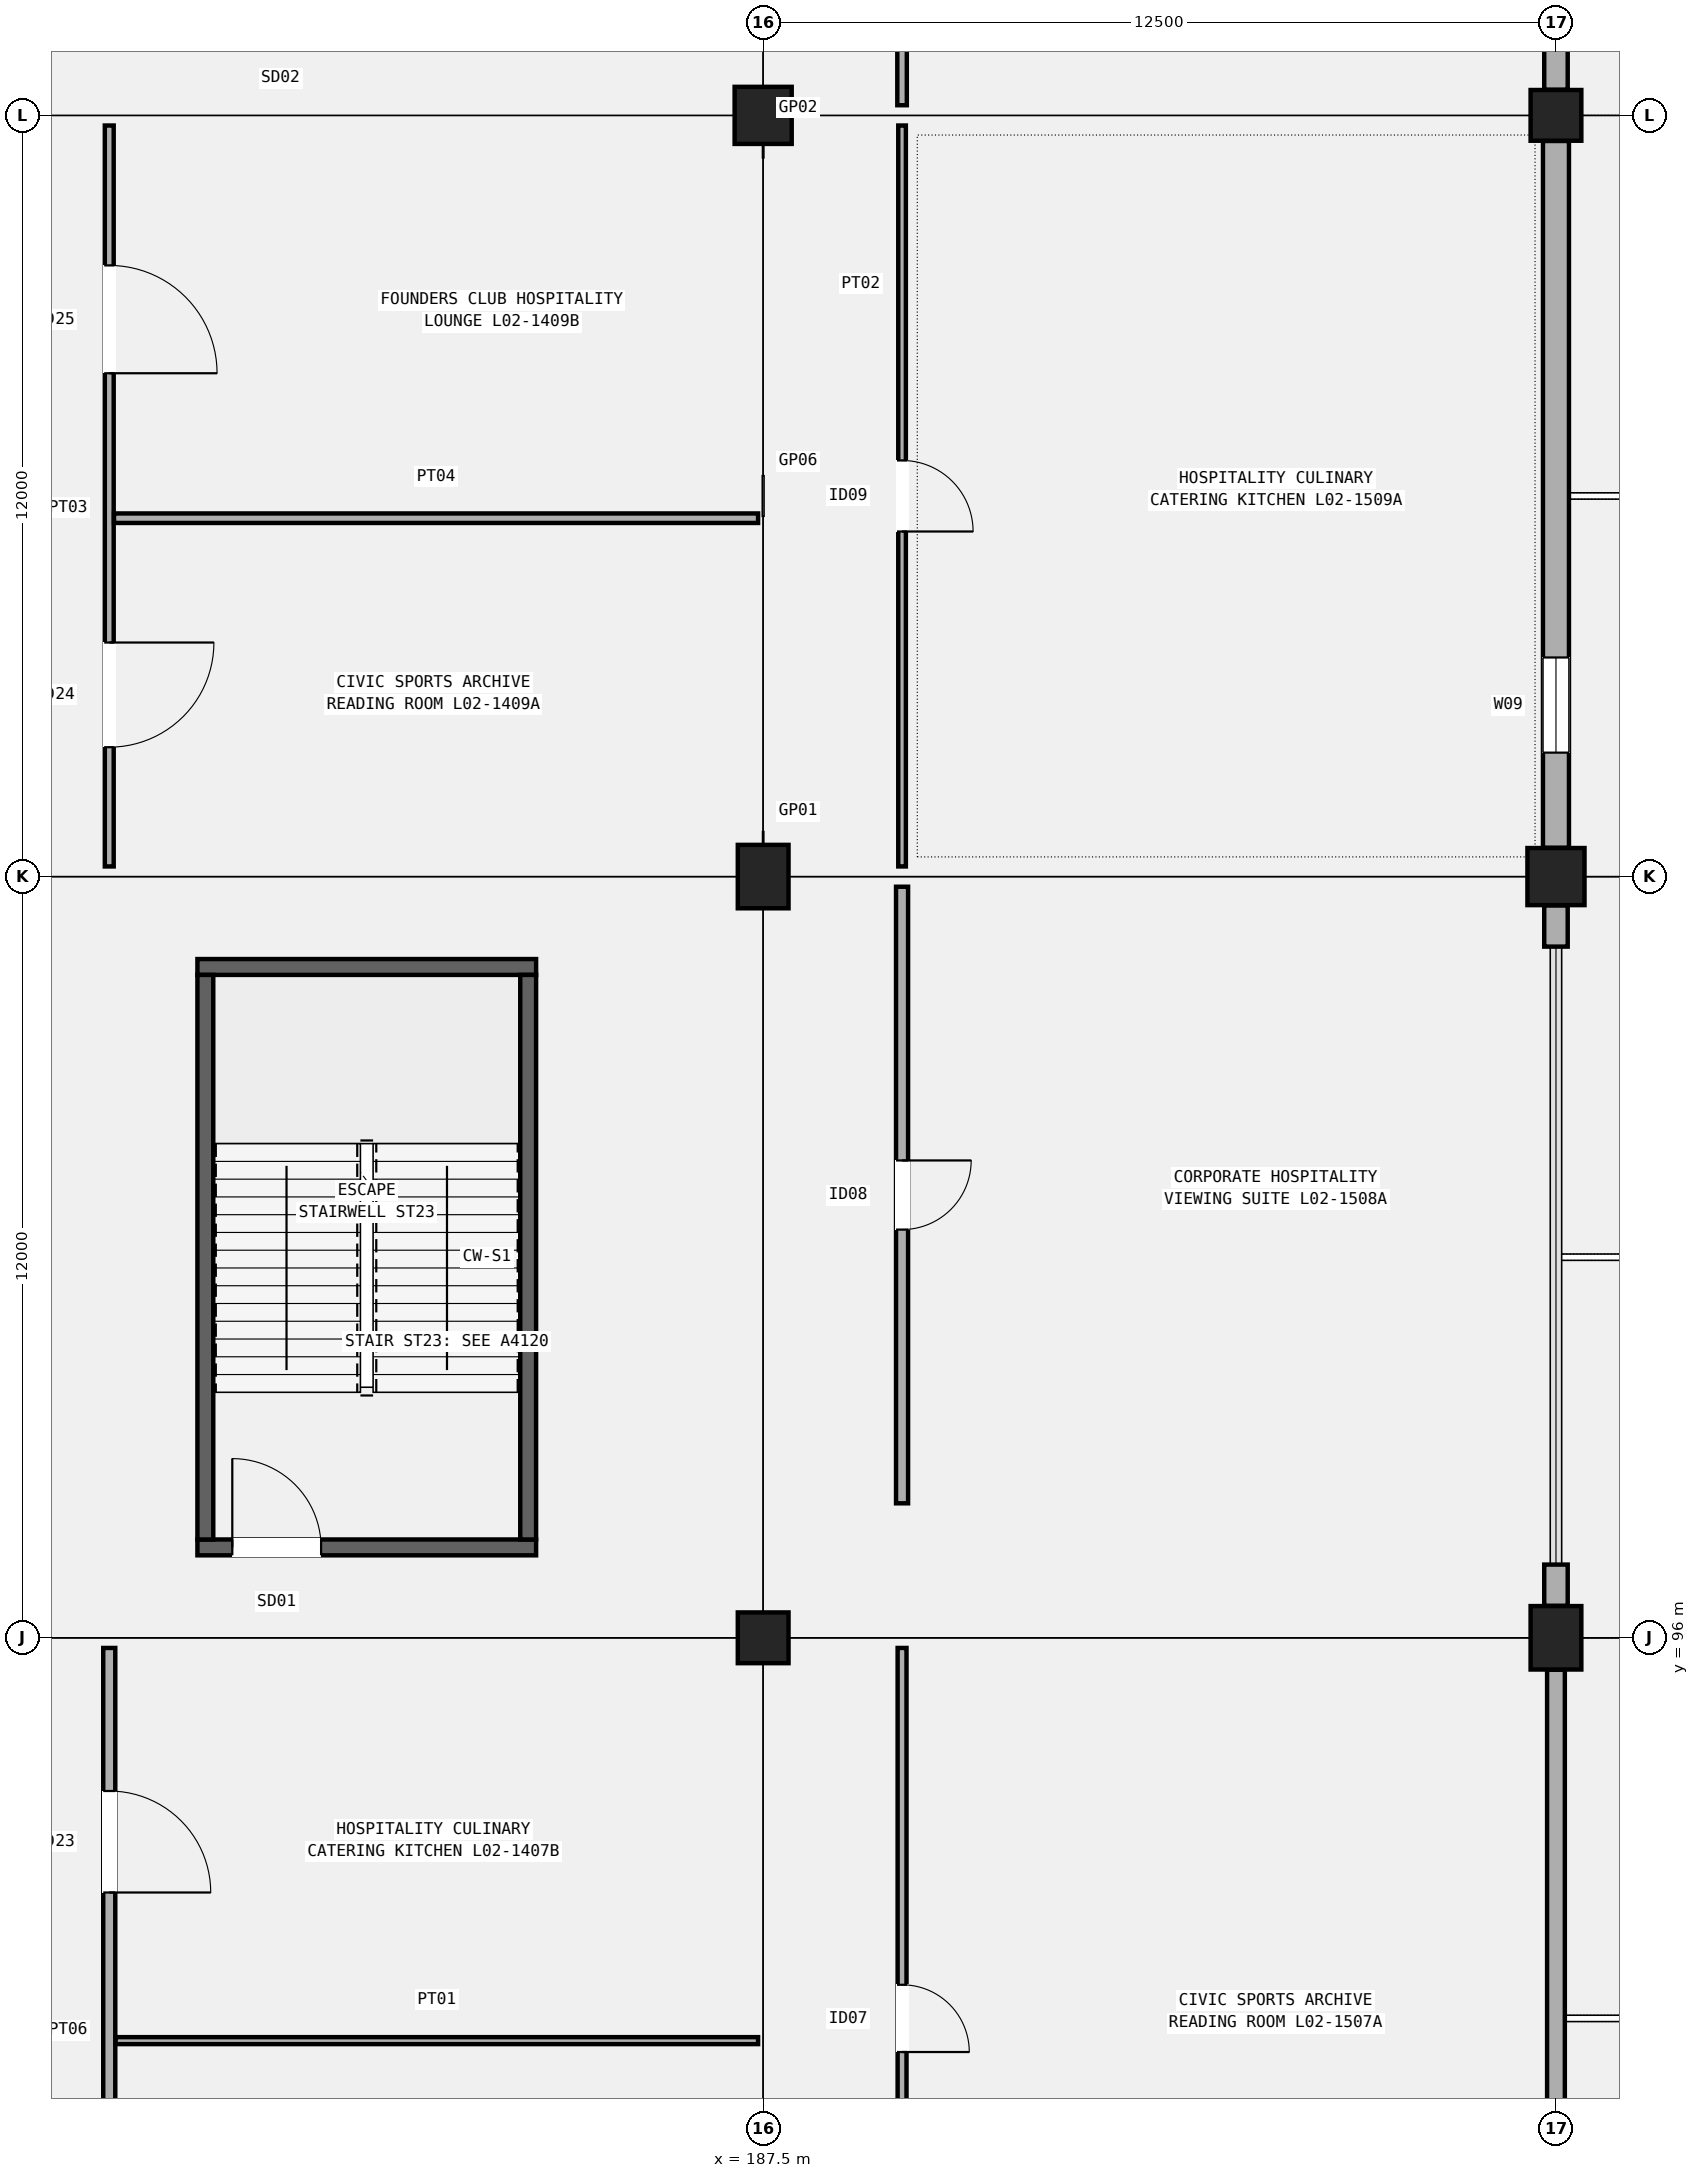
"""IFC4 building model, lengths in metres.
Left out: names, types, materials, properties, quantities, classifications, styles, units other than length and angle.
Written with IfcOpenShell. Run it as: python <this file> out.ifc"""

import sys

from ifc_helpers import new_model, si_unit, direction, frame, frame_2d, origin, origin_2d, place, context, subcontext, project, spatial, rectangle, extrude, element, fill, save


model = new_model("IFC4")
c1 = context("Model", 3, precision=1e-05, world=origin(), true_north=direction((0.0, 1.0)))
c2 = subcontext(c1, "Body", "Model", "MODEL_VIEW")
j1 = project(units=[si_unit("LENGTHUNIT", "METRE"), si_unit("PLANEANGLEUNIT", "RADIAN")], contexts=[c1])
p1 = place(None, origin())
s1 = spatial("IfcSite", under=j1, at=p1, CompositionType="ELEMENT")
p2 = place(p1, origin())
s2 = spatial("IfcBuilding", under=s1, at=p2, CompositionType="ELEMENT")
p3 = place(p2, frame((0.0, 0.0, 10.2)))
s3 = spatial("IfcBuildingStorey", under=s2, at=p3, CompositionType="ELEMENT", Elevation=10.2)
p4 = place(p3, frame((187.5, 96.0, 0.0), z_axis=(0.0, 0.0, 1.0), x_axis=(1.0, 0.0, 0.0)))
e1 = element("IfcColumn", 1, at=p4, inside=s3, PredefinedType="COLUMN", context=c2, shape_type="SweptSolid", body=[
    extrude(rectangle(XDim=0.8, YDim=0.8, at=origin_2d()), origin(), (0.0, 0.0, 1.0), 5.1),
])
p5 = place(p3, frame((187.5, 108.0, 0.0), z_axis=(0.0, 0.0, 1.0), x_axis=(1.0, 0.0, 0.0)))
e2 = element("IfcColumn", 2, at=p5, inside=s3, PredefinedType="COLUMN", context=c2, shape_type="SweptSolid", body=[
    extrude(rectangle(XDim=0.8, YDim=1.0, at=origin_2d()), origin(), (0.0, 0.0, 1.0), 5.1),
])
p6 = place(p3, frame((187.5, 120.0, 0.0), z_axis=(0.0, 0.0, 1.0), x_axis=(1.0, 0.0, 0.0)))
e3 = element("IfcColumn", 3, at=p6, inside=s3, PredefinedType="COLUMN", context=c2, shape_type="SweptSolid", body=[
    extrude(rectangle(XDim=0.9, YDim=0.9, at=origin_2d()), origin(), (0.0, 0.0, 1.0), 5.1),
])
p7 = place(p3, frame((200.0, 96.0, 0.0), z_axis=(0.0, 0.0, 1.0), x_axis=(1.0, 0.0, 0.0)))
e4 = element("IfcColumn", 4, at=p7, inside=s3, PredefinedType="COLUMN", context=c2, shape_type="SweptSolid", body=[
    extrude(rectangle(XDim=0.8, YDim=1.0, at=origin_2d()), origin(), (0.0, 0.0, 1.0), 5.1),
])
p8 = place(p3, frame((200.0, 108.0, 0.0), z_axis=(0.0, 0.0, 1.0), x_axis=(1.0, 0.0, 0.0)))
e5 = element("IfcColumn", 5, at=p8, inside=s3, PredefinedType="COLUMN", context=c2, shape_type="SweptSolid", body=[
    extrude(rectangle(XDim=0.9, YDim=0.9, at=origin_2d()), origin(), (0.0, 0.0, 1.0), 5.1),
])
p9 = place(p3, frame((200.0, 120.0, 0.0), z_axis=(0.0, 0.0, 1.0), x_axis=(1.0, 0.0, 0.0)))
e6 = element("IfcColumn", 6, at=p9, inside=s3, PredefinedType="COLUMN", context=c2, shape_type="SweptSolid", body=[
    extrude(rectangle(XDim=0.8, YDim=0.8, at=origin_2d()), origin(), (0.0, 0.0, 1.0), 5.1),
])
p10 = place(p3, frame((200.0, 84.404, 0.0), z_axis=(0.0, 0.0, 1.0), x_axis=(0.0, 1.0, 0.0)))
e7 = element("IfcWall", 7, at=p10, inside=s3, PredefinedType="SOLIDWALL", context=c2, shape_type="SweptSolid", body=[
    extrude(rectangle(XDim=11.092, YDim=0.28, at=frame_2d((5.546, 0.0))), origin(), (0.0, 0.0, 1.0), 4.232),
])
p11 = place(p10, frame((1.5, 0.0, 0.95)))
e8 = element("IfcOpeningElement", 8, at=p11, cuts=e7, PredefinedType="OPENING", context=c2, shape_type="SweptSolid", body=[
    extrude(rectangle(XDim=1.35, YDim=2.4, at=frame_2d((0.675, 1.2))), frame((0.0, 0.15, 0.0), z_axis=(0.0, -1.0, 0.0), x_axis=(1.0, 0.0, 0.0)), (0.0, 0.0, 1.0), 0.3),
])
p12 = place(p3, frame((200.0, 96.504, 0.0), z_axis=(0.0, 0.0, 1.0), x_axis=(0.0, 1.0, 0.0)))
e9 = element("IfcWall", 9, at=p12, inside=s3, PredefinedType="SOLIDWALL", context=c2, shape_type="SweptSolid", body=[
    extrude(rectangle(XDim=0.65, YDim=0.37, at=frame_2d((0.325, 0.0))), origin(), (0.0, 0.0, 1.0), 4.02),
])
p13 = place(p3, frame((200.0, 106.896, 0.0), z_axis=(0.0, 0.0, 1.0), x_axis=(0.0, 1.0, 0.0)))
e10 = element("IfcWall", 10, at=p13, inside=s3, PredefinedType="SOLIDWALL", context=c2, shape_type="SweptSolid", body=[
    extrude(rectangle(XDim=0.65, YDim=0.37, at=frame_2d((0.325, 0.0))), origin(), (0.0, 0.0, 1.0), 4.02),
])
p14 = place(p3, frame((200.0, 108.454, 0.0), z_axis=(0.0, 0.0, 1.0), x_axis=(0.0, 1.0, 0.0)))
e11 = element("IfcWall", 11, at=p14, inside=s3, PredefinedType="SOLIDWALL", context=c2, shape_type="SweptSolid", body=[
    extrude(rectangle(XDim=11.142, YDim=0.41, at=frame_2d((5.571, 0.0))), origin(), (0.0, 0.0, 1.0), 4.12),
])
p15 = place(p14, frame((1.5, 0.0, 0.95)))
e12 = element("IfcOpeningElement", 12, at=p15, cuts=e11, PredefinedType="OPENING", context=c2, shape_type="SweptSolid", body=[
    extrude(rectangle(XDim=1.5, YDim=1.8, at=frame_2d((0.75, 0.9))), frame((0.0, 0.215, 0.0), z_axis=(0.0, -1.0, 0.0), x_axis=(1.0, 0.0, 0.0)), (0.0, 0.0, 1.0), 0.43),
])
p16 = place(p3, frame((200.0, 120.404, 0.0), z_axis=(0.0, 0.0, 1.0), x_axis=(0.0, 1.0, 0.0)))
e13 = element("IfcWall", 13, at=p16, inside=s3, PredefinedType="SOLIDWALL", context=c2, shape_type="SweptSolid", body=[
    extrude(rectangle(XDim=0.65, YDim=0.37, at=frame_2d((0.325, 0.0))), origin(), (0.0, 0.0, 1.0), 4.232),
])
p17 = place(p3, frame((178.58, 97.425, 0.0), z_axis=(0.0, 0.0, 1.0), x_axis=(1.0, 0.0, 0.0)))
e14 = element("IfcWall", 14, at=p17, inside=s3, PredefinedType="SHEAR", context=c2, shape_type="SweptSolid", body=[
    extrude(rectangle(XDim=5.34, YDim=0.25, at=frame_2d((2.67, 0.0))), origin(), (0.0, 0.0, 1.0), 4.82),
])
p18 = place(p17, frame((0.55, 0.0, 0.0)))
e15 = element("IfcOpeningElement", 15, at=p18, cuts=e14, PredefinedType="OPENING", context=c2, shape_type="SweptSolid", body=[
    extrude(rectangle(XDim=1.4, YDim=2.15, at=frame_2d((0.7, 1.075))), frame((0.0, 0.135, 0.0), z_axis=(0.0, -1.0, 0.0), x_axis=(1.0, 0.0, 0.0)), (0.0, 0.0, 1.0), 0.27),
])
p19 = place(p3, frame((178.58, 106.575, 0.0), z_axis=(0.0, 0.0, 1.0), x_axis=(1.0, 0.0, 0.0)))
e16 = element("IfcWall", 16, at=p19, inside=s3, PredefinedType="SHEAR", context=c2, shape_type="SweptSolid", body=[
    extrude(rectangle(XDim=5.34, YDim=0.25, at=frame_2d((2.67, 0.0))), origin(), (0.0, 0.0, 1.0), 4.82),
])
for number, where, z_axis, x_axis in (
    (17, (178.705, 97.55, 0.0), (0.0, 0.0, 1.0), (0.0, 1.0, 0.0)),
    (18, (183.795, 97.55, 0.0), (0.0, 0.0, 1.0), (0.0, 1.0, 0.0)),
):
    element("IfcWall", number, at=place(p3, frame(where, z_axis=z_axis, x_axis=x_axis)), inside=s3, PredefinedType="SHEAR", context=c2, shape_type="SweptSolid", body=[
        extrude(rectangle(XDim=8.9, YDim=0.25, at=frame_2d((4.45, 0.0))), origin(), (0.0, 0.0, 1.0), 4.82),
    ])
p20 = place(p3, frame((177.19, 84.16, 0.0), z_axis=(0.0, 0.0, 1.0), x_axis=(0.0, 1.0, 0.0)))
e19 = element("IfcWall", 19, at=p20, inside=s3, PredefinedType="PARTITIONING", context=c2, shape_type="SweptSolid", body=[
    extrude(rectangle(XDim=11.68, YDim=0.19, at=frame_2d((5.84, 0.0))), origin(), (0.0, 0.0, 1.0), 4.22),
])
p21 = place(p20, frame((3.485, 0.0, 0.0), z_axis=(0.0, 0.0, 1.0), x_axis=(-1.0, 0.0, 0.0)))
e20 = element("IfcOpeningElement", 20, at=p21, cuts=e19, PredefinedType="OPENING", context=c2, shape_type="SweptSolid", body=[
    extrude(rectangle(XDim=1.56, YDim=2.26, at=frame_2d((0.78, 1.13))), frame((0.0, 0.105, 0.0), z_axis=(0.0, -1.0, 0.0), x_axis=(1.0, 0.0, 0.0)), (0.0, 0.0, 1.0), 0.21),
])
p22 = place(p20, frame((9.425, 0.0, 0.0), z_axis=(0.0, 0.0, 1.0), x_axis=(-1.0, 0.0, 0.0)))
e21 = element("IfcOpeningElement", 21, at=p22, cuts=e19, PredefinedType="OPENING", context=c2, shape_type="SweptSolid", body=[
    extrude(rectangle(XDim=1.6, YDim=2.3, at=frame_2d((0.8, 1.15))), frame((0.0, 0.105, 0.0), z_axis=(0.0, -1.0, 0.0), x_axis=(1.0, 0.0, 0.0)), (0.0, 0.0, 1.0), 0.21),
])
p23 = place(p3, frame((177.29, 89.65, 0.0), z_axis=(0.0, 0.0, 1.0), x_axis=(1.0, 0.0, 0.0)))
e22 = element("IfcWall", 22, at=p23, inside=s3, PredefinedType="PARTITIONING", context=c2, shape_type="SweptSolid", body=[
    extrude(rectangle(XDim=10.13, YDim=0.11, at=frame_2d((5.065, 0.0))), origin(), (0.0, 0.0, 1.0), 4.22),
])
p24 = place(p3, frame((177.19, 108.16, 0.0), z_axis=(0.0, 0.0, 1.0), x_axis=(0.0, 1.0, 0.0)))
e23 = element("IfcWall", 23, at=p24, inside=s3, PredefinedType="PARTITIONING", context=c2, shape_type="SweptSolid", body=[
    extrude(rectangle(XDim=11.68, YDim=0.14, at=frame_2d((5.84, 0.0))), origin(), (0.0, 0.0, 1.0), 4.22),
])
p25 = place(p24, frame((3.53, 0.0, 0.0), z_axis=(0.0, 0.0, 1.0), x_axis=(-1.0, 0.0, 0.0)))
e24 = element("IfcOpeningElement", 24, at=p25, cuts=e23, PredefinedType="OPENING", context=c2, shape_type="SweptSolid", body=[
    extrude(rectangle(XDim=1.65, YDim=2.28, at=frame_2d((0.825, 1.14))), frame((0.0, 0.08, 0.0), z_axis=(0.0, -1.0, 0.0), x_axis=(1.0, 0.0, 0.0)), (0.0, 0.0, 1.0), 0.16),
])
p26 = place(p24, frame((9.475, 0.0, 0.0), z_axis=(0.0, 0.0, 1.0), x_axis=(-1.0, 0.0, 0.0)))
e25 = element("IfcOpeningElement", 25, at=p26, cuts=e23, PredefinedType="OPENING", context=c2, shape_type="SweptSolid", body=[
    extrude(rectangle(XDim=1.7, YDim=2.32, at=frame_2d((0.85, 1.16))), frame((0.0, 0.08, 0.0), z_axis=(0.0, -1.0, 0.0), x_axis=(1.0, 0.0, 0.0)), (0.0, 0.0, 1.0), 0.16),
])
p27 = place(p3, frame((177.265, 113.65, 0.0), z_axis=(0.0, 0.0, 1.0), x_axis=(1.0, 0.0, 0.0)))
e26 = element("IfcWall", 26, at=p27, inside=s3, PredefinedType="PARTITIONING", context=c2, shape_type="SweptSolid", body=[
    extrude(rectangle(XDim=10.155, YDim=0.15, at=frame_2d((5.078, 0.0))), origin(), (0.0, 0.0, 1.0), 4.22),
])
p28 = place(p3, frame((189.69, 84.16, 0.0), z_axis=(0.0, 0.0, 1.0), x_axis=(0.0, 1.0, 0.0)))
e27 = element("IfcWall", 27, at=p28, inside=s3, PredefinedType="PARTITIONING", context=c2, shape_type="SweptSolid", body=[
    extrude(rectangle(XDim=11.68, YDim=0.14, at=frame_2d((5.84, 0.0))), origin(), (0.0, 0.0, 1.0), 4.22),
])
p29 = place(p28, frame((6.37, 0.0, 0.0), z_axis=(0.0, 0.0, 1.0), x_axis=(-1.0, 0.0, 0.0)))
e28 = element("IfcOpeningElement", 28, at=p29, cuts=e27, PredefinedType="OPENING", context=c2, shape_type="SweptSolid", body=[
    extrude(rectangle(XDim=1.06, YDim=2.15, at=frame_2d((0.53, 1.075))), frame((0.0, 0.08, 0.0), z_axis=(0.0, -1.0, 0.0), x_axis=(1.0, 0.0, 0.0)), (0.0, 0.0, 1.0), 0.16),
])
p30 = place(p3, frame((189.69, 98.12, 0.0), z_axis=(0.0, 0.0, 1.0), x_axis=(0.0, 1.0, 0.0)))
e29 = element("IfcWall", 29, at=p30, inside=s3, PredefinedType="PARTITIONING", context=c2, shape_type="SweptSolid", body=[
    extrude(rectangle(XDim=9.72, YDim=0.19, at=frame_2d((4.86, 0.0))), origin(), (0.0, 0.0, 1.0), 4.22),
])
p31 = place(p30, frame((5.405, 0.0, 0.0), z_axis=(0.0, 0.0, 1.0), x_axis=(-1.0, 0.0, 0.0)))
e30 = element("IfcOpeningElement", 30, at=p31, cuts=e29, PredefinedType="OPENING", context=c2, shape_type="SweptSolid", body=[
    extrude(rectangle(XDim=1.09, YDim=2.16, at=frame_2d((0.545, 1.08))), frame((0.0, 0.105, 0.0), z_axis=(0.0, -1.0, 0.0), x_axis=(1.0, 0.0, 0.0)), (0.0, 0.0, 1.0), 0.21),
])
p32 = place(p3, frame((189.69, 108.16, 0.0), z_axis=(0.0, 0.0, 1.0), x_axis=(0.0, 1.0, 0.0)))
e31 = element("IfcWall", 31, at=p32, inside=s3, PredefinedType="PARTITIONING", context=c2, shape_type="SweptSolid", body=[
    extrude(rectangle(XDim=11.68, YDim=0.12, at=frame_2d((5.84, 0.0))), origin(), (0.0, 0.0, 1.0), 4.22),
])
p33 = place(p32, frame((6.4, 0.0, 0.0), z_axis=(0.0, 0.0, 1.0), x_axis=(-1.0, 0.0, 0.0)))
e32 = element("IfcOpeningElement", 32, at=p33, cuts=e31, PredefinedType="OPENING", context=c2, shape_type="SweptSolid", body=[
    extrude(rectangle(XDim=1.12, YDim=2.18, at=frame_2d((0.56, 1.09))), frame((0.0, 0.07, 0.0), z_axis=(0.0, -1.0, 0.0), x_axis=(1.0, 0.0, 0.0)), (0.0, 0.0, 1.0), 0.14),
])
p34 = place(p3, frame((189.69, 120.16, 0.0), z_axis=(0.0, 0.0, 1.0), x_axis=(0.0, 1.0, 0.0)))
e33 = element("IfcWall", 33, at=p34, inside=s3, PredefinedType="PARTITIONING", context=c2, shape_type="SweptSolid", body=[
    extrude(rectangle(XDim=11.68, YDim=0.15, at=frame_2d((5.84, 0.0))), origin(), (0.0, 0.0, 1.0), 4.22),
])
p35 = place(p34, frame((6.415, 0.0, 0.0), z_axis=(0.0, 0.0, 1.0), x_axis=(-1.0, 0.0, 0.0)))
e34 = element("IfcOpeningElement", 34, at=p35, cuts=e33, PredefinedType="OPENING", context=c2, shape_type="SweptSolid", body=[
    extrude(rectangle(XDim=1.15, YDim=2.15, at=frame_2d((0.575, 1.075))), frame((0.0, 0.085, 0.0), z_axis=(0.0, -1.0, 0.0), x_axis=(1.0, 0.0, 0.0)), (0.0, 0.0, 1.0), 0.17),
])
p36 = place(p15, origin())
e35 = element("IfcWindow", 35, at=p36, inside=s3, PartitioningType="SINGLE_PANEL", PredefinedType="WINDOW", context=c2, shape_type="SweptSolid", body=[
    extrude(rectangle(XDim=1.5, YDim=1.8, at=frame_2d((0.75, 0.9))), frame((0.0, 0.03, 0.0), z_axis=(0.0, -1.0, 0.0), x_axis=(1.0, 0.0, 0.0)), (0.0, 0.0, 1.0), 0.06),
])
fill(e12, e35)
p37 = place(p18, origin())
e36 = element("IfcDoor", 36, at=p37, inside=s3, OperationType="SINGLE_SWING_LEFT", PredefinedType="DOOR", context=c2, shape_type="SweptSolid", body=[
    extrude(rectangle(XDim=1.4, YDim=2.15, at=frame_2d((0.7, 1.075))), frame((0.0, 0.025, 0.0), z_axis=(0.0, -1.0, 0.0), x_axis=(1.0, 0.0, 0.0)), (0.0, 0.0, 1.0), 0.05),
])
fill(e15, e36)
p38 = place(p22, origin())
e37 = element("IfcDoor", 37, at=p38, inside=s3, OperationType="SINGLE_SWING_RIGHT", PredefinedType="DOOR", context=c2, shape_type="SweptSolid", body=[
    extrude(rectangle(XDim=1.6, YDim=2.3, at=frame_2d((0.8, 1.15))), frame((0.0, 0.025, 0.0), z_axis=(0.0, -1.0, 0.0), x_axis=(1.0, 0.0, 0.0)), (0.0, 0.0, 1.0), 0.05),
])
fill(e21, e37)
p39 = place(p25, origin())
e38 = element("IfcDoor", 38, at=p39, inside=s3, OperationType="SINGLE_SWING_LEFT", PredefinedType="DOOR", context=c2, shape_type="SweptSolid", body=[
    extrude(rectangle(XDim=1.65, YDim=2.28, at=frame_2d((0.825, 1.14))), frame((0.0, 0.025, 0.0), z_axis=(0.0, -1.0, 0.0), x_axis=(1.0, 0.0, 0.0)), (0.0, 0.0, 1.0), 0.05),
])
fill(e24, e38)
p40 = place(p26, origin())
e39 = element("IfcDoor", 39, at=p40, inside=s3, OperationType="SINGLE_SWING_RIGHT", PredefinedType="DOOR", context=c2, shape_type="SweptSolid", body=[
    extrude(rectangle(XDim=1.7, YDim=2.32, at=frame_2d((0.85, 1.16))), frame((0.0, 0.025, 0.0), z_axis=(0.0, -1.0, 0.0), x_axis=(1.0, 0.0, 0.0)), (0.0, 0.0, 1.0), 0.05),
])
fill(e25, e39)
p41 = place(p29, origin())
e40 = element("IfcDoor", 40, at=p41, inside=s3, OperationType="SINGLE_SWING_RIGHT", PredefinedType="DOOR", context=c2, shape_type="SweptSolid", body=[
    extrude(rectangle(XDim=1.06, YDim=2.15, at=frame_2d((0.53, 1.075))), frame((0.0, 0.025, 0.0), z_axis=(0.0, -1.0, 0.0), x_axis=(1.0, 0.0, 0.0)), (0.0, 0.0, 1.0), 0.05),
])
fill(e28, e40)
p42 = place(p31, origin())
e41 = element("IfcDoor", 41, at=p42, inside=s3, OperationType="SINGLE_SWING_LEFT", PredefinedType="DOOR", context=c2, shape_type="SweptSolid", body=[
    extrude(rectangle(XDim=1.09, YDim=2.16, at=frame_2d((0.545, 1.08))), frame((0.0, 0.025, 0.0), z_axis=(0.0, -1.0, 0.0), x_axis=(1.0, 0.0, 0.0)), (0.0, 0.0, 1.0), 0.05),
])
fill(e30, e41)
p43 = place(p33, origin())
e42 = element("IfcDoor", 42, at=p43, inside=s3, OperationType="SINGLE_SWING_RIGHT", PredefinedType="DOOR", context=c2, shape_type="SweptSolid", body=[
    extrude(rectangle(XDim=1.12, YDim=2.18, at=frame_2d((0.56, 1.09))), frame((0.0, 0.025, 0.0), z_axis=(0.0, -1.0, 0.0), x_axis=(1.0, 0.0, 0.0)), (0.0, 0.0, 1.0), 0.05),
])
fill(e32, e42)
save(model, sys.argv[1])
